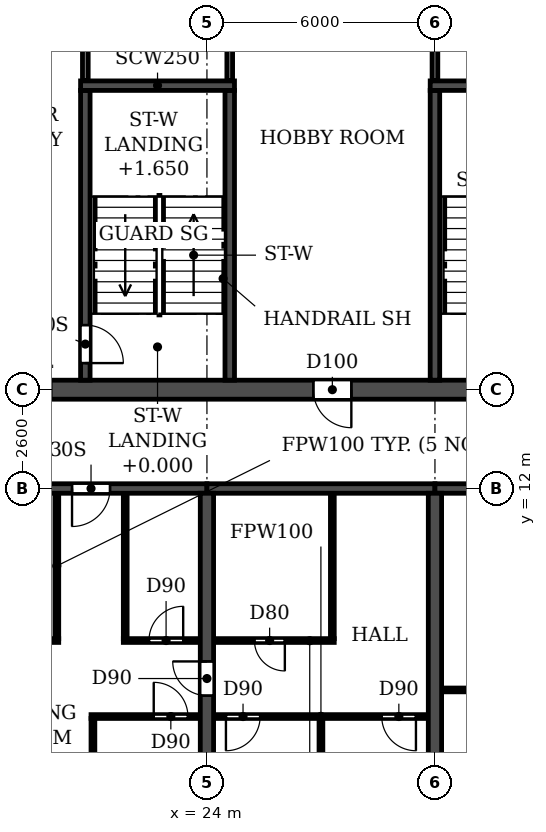
"""IFC4 building model, lengths in metres.
Left out: names, types, materials, properties, quantities, classifications, styles, units other than length and angle.
Written with IfcOpenShell. Run it as: python <this file> out.ifc"""

import sys

from ifc_helpers import new_model, si_unit, direction, frame, frame_2d, origin, place, context, subcontext, project, spatial, rectangle, extrude, element, fill, save


model = new_model("IFC4")
c1 = context("Model", 3, precision=1e-05, world=origin(), true_north=direction((0.0, 1.0)))
c2 = subcontext(c1, "Body", "Model", "MODEL_VIEW")
j1 = project(units=[si_unit("LENGTHUNIT", "METRE"), si_unit("PLANEANGLEUNIT", "RADIAN")], contexts=[c1])
p1 = place(None, origin())
s1 = spatial("IfcSite", under=j1, at=p1, CompositionType="ELEMENT")
p2 = place(p1, origin())
s2 = spatial("IfcBuilding", under=s1, at=p2, CompositionType="ELEMENT")
p3 = place(p2, frame((0.0, 0.0, 102.6)))
s3 = spatial("IfcBuildingStorey", under=s2, at=p3, CompositionType="ELEMENT", Elevation=102.6)
p4 = place(p3, frame((24.0, 0.2, 0.0), z_axis=(0.0, 0.0, 1.0), x_axis=(0.0, 1.0, 0.0)))
e1 = element("IfcWall", 1, at=p4, inside=s3, PredefinedType="SHEAR", context=c2, shape_type="SweptSolid", body=[
    extrude(rectangle(XDim=11.675, YDim=0.35, at=frame_2d((5.837, 0.0))), origin(), (0.0, 0.0, 1.0), 3.0),
])
p5 = place(p4, frame((6.35, 0.0, 0.0)))
e2 = element("IfcOpeningElement", 2, at=p5, cuts=e1, PredefinedType="OPENING", context=c2, shape_type="SweptSolid", body=[
    extrude(rectangle(XDim=0.9, YDim=2.1, at=frame_2d((0.45, 1.05))), frame((0.0, 0.185, 0.0), z_axis=(0.0, -1.0, 0.0), x_axis=(1.0, 0.0, 0.0)), (0.0, 0.0, 1.0), 0.37),
])
p6 = place(p3, frame((30.0, 0.2, 0.0), z_axis=(0.0, 0.0, 1.0), x_axis=(0.0, 1.0, 0.0)))
e3 = element("IfcWall", 3, at=p6, inside=s3, PredefinedType="SHEAR", context=c2, shape_type="SweptSolid", body=[
    extrude(rectangle(XDim=11.675, YDim=0.35, at=frame_2d((5.837, 0.0))), origin(), (0.0, 0.0, 1.0), 3.0),
])
p7 = place(p3, frame((18.0, 12.0, 0.0), z_axis=(0.0, 0.0, 1.0), x_axis=(1.0, 0.0, 0.0)))
e4 = element("IfcWall", 4, at=p7, inside=s3, PredefinedType="SHEAR", context=c2, shape_type="SweptSolid", body=[
    extrude(rectangle(XDim=6.0, YDim=0.25, at=frame_2d((3.0, 0.0))), origin(), (0.0, 0.0, 1.0), 2.4),
])
p8 = place(p7, frame((2.45, 0.0, 0.0)))
e5 = element("IfcOpeningElement", 5, at=p8, cuts=e4, PredefinedType="OPENING", context=c2, shape_type="SweptSolid", body=[
    extrude(rectangle(XDim=1.0, YDim=2.1, at=frame_2d((0.5, 1.05))), frame((0.0, 0.135, 0.0), z_axis=(0.0, -1.0, 0.0), x_axis=(1.0, 0.0, 0.0)), (0.0, 0.0, 1.0), 0.27),
])
p9 = place(p3, frame((24.0, 12.0, 0.0), z_axis=(0.0, 0.0, 1.0), x_axis=(1.0, 0.0, 0.0)))
e6 = element("IfcWall", 6, at=p9, inside=s3, PredefinedType="SHEAR", context=c2, shape_type="SweptSolid", body=[
    extrude(rectangle(XDim=6.0, YDim=0.25, at=frame_2d((3.0, 0.0))), origin(), (0.0, 0.0, 1.0), 2.4),
])
p10 = place(p3, frame((30.0, 12.0, 0.0), z_axis=(0.0, 0.0, 1.0), x_axis=(1.0, 0.0, 0.0)))
e7 = element("IfcWall", 7, at=p10, inside=s3, PredefinedType="SHEAR", context=c2, shape_type="SweptSolid", body=[
    extrude(rectangle(XDim=6.0, YDim=0.25, at=frame_2d((3.0, 0.0))), origin(), (0.0, 0.0, 1.0), 2.4),
])
p11 = place(p10, frame((2.45, 0.0, 0.0)))
e8 = element("IfcOpeningElement", 8, at=p11, cuts=e7, PredefinedType="OPENING", context=c2, shape_type="SweptSolid", body=[
    extrude(rectangle(XDim=1.0, YDim=2.1, at=frame_2d((0.5, 1.05))), frame((0.0, 0.135, 0.0), z_axis=(0.0, -1.0, 0.0), x_axis=(1.0, 0.0, 0.0)), (0.0, 0.0, 1.0), 0.27),
])
p12 = place(p3, frame((8.6, 14.6, 0.0), z_axis=(0.0, 0.0, 1.0), x_axis=(1.0, 0.0, 0.0)))
e9 = element("IfcWall", 9, at=p12, inside=s3, PredefinedType="SOLIDWALL", context=c2, shape_type="SweptSolid", body=[
    extrude(rectangle(XDim=84.8, YDim=0.5, at=frame_2d((42.4, 0.0))), origin(), (0.0, 0.0, 1.0), 3.0),
])
p13 = place(p12, frame((0.9, 0.0, 0.0)))
e10 = element("IfcOpeningElement", 10, at=p13, cuts=e9, PredefinedType="OPENING", context=c2, shape_type="SweptSolid", body=[
    extrude(rectangle(XDim=1.0, YDim=2.1, at=frame_2d((0.5, 1.05))), frame((0.0, 0.26, 0.0), z_axis=(0.0, -1.0, 0.0), x_axis=(1.0, 0.0, 0.0)), (0.0, 0.0, 1.0), 0.52),
])
p14 = place(p12, frame((5.6, 0.0, 0.0)))
e11 = element("IfcOpeningElement", 11, at=p14, cuts=e9, PredefinedType="OPENING", context=c2, shape_type="SweptSolid", body=[
    extrude(rectangle(XDim=1.0, YDim=2.1, at=frame_2d((0.5, 1.05))), frame((0.0, 0.26, 0.0), z_axis=(0.0, -1.0, 0.0), x_axis=(1.0, 0.0, 0.0)), (0.0, 0.0, 1.0), 0.52),
])
p15 = place(p12, frame((10.3, 0.0, 0.0)))
e12 = element("IfcOpeningElement", 12, at=p15, cuts=e9, PredefinedType="OPENING", context=c2, shape_type="SweptSolid", body=[
    extrude(rectangle(XDim=1.0, YDim=2.1, at=frame_2d((0.5, 1.05))), frame((0.0, 0.26, 0.0), z_axis=(0.0, -1.0, 0.0), x_axis=(1.0, 0.0, 0.0)), (0.0, 0.0, 1.0), 0.52),
])
p16 = place(p12, frame((18.2, 0.0, 0.0)))
e13 = element("IfcOpeningElement", 13, at=p16, cuts=e9, PredefinedType="OPENING", context=c2, shape_type="SweptSolid", body=[
    extrude(rectangle(XDim=1.0, YDim=2.1, at=frame_2d((0.5, 1.05))), frame((0.0, 0.26, 0.0), z_axis=(0.0, -1.0, 0.0), x_axis=(1.0, 0.0, 0.0)), (0.0, 0.0, 1.0), 0.52),
])
p17 = place(p12, frame((22.8, 0.0, 0.0)))
e14 = element("IfcOpeningElement", 14, at=p17, cuts=e9, PredefinedType="OPENING", context=c2, shape_type="SweptSolid", body=[
    extrude(rectangle(XDim=1.0, YDim=2.1, at=frame_2d((0.5, 1.05))), frame((0.0, 0.26, 0.0), z_axis=(0.0, -1.0, 0.0), x_axis=(1.0, 0.0, 0.0)), (0.0, 0.0, 1.0), 0.52),
])
p18 = place(p12, frame((36.7, 0.0, 0.0)))
e15 = element("IfcOpeningElement", 15, at=p18, cuts=e9, PredefinedType="OPENING", context=c2, shape_type="SweptSolid", body=[
    extrude(rectangle(XDim=1.0, YDim=2.1, at=frame_2d((0.5, 1.05))), frame((0.0, 0.26, 0.0), z_axis=(0.0, -1.0, 0.0), x_axis=(1.0, 0.0, 0.0)), (0.0, 0.0, 1.0), 0.52),
])
p19 = place(p12, frame((41.9, 0.0, 0.0)))
e16 = element("IfcOpeningElement", 16, at=p19, cuts=e9, PredefinedType="OPENING", context=c2, shape_type="SweptSolid", body=[
    extrude(rectangle(XDim=1.0, YDim=2.1, at=frame_2d((0.5, 1.05))), frame((0.0, 0.26, 0.0), z_axis=(0.0, -1.0, 0.0), x_axis=(1.0, 0.0, 0.0)), (0.0, 0.0, 1.0), 0.52),
])
p20 = place(p12, frame((47.1, 0.0, 0.0)))
e17 = element("IfcOpeningElement", 17, at=p20, cuts=e9, PredefinedType="OPENING", context=c2, shape_type="SweptSolid", body=[
    extrude(rectangle(XDim=1.0, YDim=2.1, at=frame_2d((0.5, 1.05))), frame((0.0, 0.26, 0.0), z_axis=(0.0, -1.0, 0.0), x_axis=(1.0, 0.0, 0.0)), (0.0, 0.0, 1.0), 0.52),
])
p21 = place(p12, frame((61.0, 0.0, 0.0)))
e18 = element("IfcOpeningElement", 18, at=p21, cuts=e9, PredefinedType="OPENING", context=c2, shape_type="SweptSolid", body=[
    extrude(rectangle(XDim=1.0, YDim=2.1, at=frame_2d((0.5, 1.05))), frame((0.0, 0.26, 0.0), z_axis=(0.0, -1.0, 0.0), x_axis=(1.0, 0.0, 0.0)), (0.0, 0.0, 1.0), 0.52),
])
p22 = place(p12, frame((65.6, 0.0, 0.0)))
e19 = element("IfcOpeningElement", 19, at=p22, cuts=e9, PredefinedType="OPENING", context=c2, shape_type="SweptSolid", body=[
    extrude(rectangle(XDim=1.0, YDim=2.1, at=frame_2d((0.5, 1.05))), frame((0.0, 0.26, 0.0), z_axis=(0.0, -1.0, 0.0), x_axis=(1.0, 0.0, 0.0)), (0.0, 0.0, 1.0), 0.52),
])
p23 = place(p12, frame((73.5, 0.0, 0.0)))
e20 = element("IfcOpeningElement", 20, at=p23, cuts=e9, PredefinedType="OPENING", context=c2, shape_type="SweptSolid", body=[
    extrude(rectangle(XDim=1.0, YDim=2.1, at=frame_2d((0.5, 1.05))), frame((0.0, 0.26, 0.0), z_axis=(0.0, -1.0, 0.0), x_axis=(1.0, 0.0, 0.0)), (0.0, 0.0, 1.0), 0.52),
])
p24 = place(p12, frame((79.6, 0.0, 0.0)))
e21 = element("IfcOpeningElement", 21, at=p24, cuts=e9, PredefinedType="OPENING", context=c2, shape_type="SweptSolid", body=[
    extrude(rectangle(XDim=1.0, YDim=2.1, at=frame_2d((0.5, 1.05))), frame((0.0, 0.26, 0.0), z_axis=(0.0, -1.0, 0.0), x_axis=(1.0, 0.0, 0.0)), (0.0, 0.0, 1.0), 0.52),
])
p25 = place(p3, frame((30.0, 14.85, 0.0), z_axis=(0.0, 0.0, 1.0), x_axis=(0.0, 1.0, 0.0)))
e22 = element("IfcWall", 22, at=p25, inside=s3, PredefinedType="SOLIDWALL", context=c2, shape_type="SweptSolid", body=[
    extrude(rectangle(XDim=7.625, YDim=0.25, at=frame_2d((3.812, 0.0))), origin(), (0.0, 0.0, 1.0), 3.0),
])
p26 = place(p3, frame((29.875, 22.6, 0.0), z_axis=(0.0, 0.0, 1.0), x_axis=(1.0, 0.0, 0.0)))
e23 = element("IfcWall", 23, at=p26, inside=s3, PredefinedType="SOLIDWALL", context=c2, shape_type="SweptSolid", body=[
    extrude(rectangle(XDim=4.05, YDim=0.25, at=frame_2d((2.025, 0.0))), origin(), (0.0, 0.0, 1.0), 3.0),
])
p27 = place(p3, frame((20.8, 14.85, 0.0), z_axis=(0.0, 0.0, 1.0), x_axis=(0.0, 1.0, 0.0)))
e24 = element("IfcWall", 24, at=p27, inside=s3, PredefinedType="SOLIDWALL", context=c2, shape_type="SweptSolid", body=[
    extrude(rectangle(XDim=7.625, YDim=0.25, at=frame_2d((3.812, 0.0))), origin(), (0.0, 0.0, 1.0), 3.0),
])
p28 = place(p27, frame((0.45, 0.0, 0.0)))
e25 = element("IfcOpeningElement", 25, at=p28, cuts=e24, PredefinedType="OPENING", context=c2, shape_type="SweptSolid", body=[
    extrude(rectangle(XDim=1.0, YDim=2.1, at=frame_2d((0.5, 1.05))), frame((0.0, 0.135, 0.0), z_axis=(0.0, -1.0, 0.0), x_axis=(1.0, 0.0, 0.0)), (0.0, 0.0, 1.0), 0.27),
])
p29 = place(p3, frame((24.6, 14.85, 0.0), z_axis=(0.0, 0.0, 1.0), x_axis=(0.0, 1.0, 0.0)))
e26 = element("IfcWall", 26, at=p29, inside=s3, PredefinedType="SOLIDWALL", context=c2, shape_type="SweptSolid", body=[
    extrude(rectangle(XDim=7.625, YDim=0.25, at=frame_2d((3.812, 0.0))), origin(), (0.0, 0.0, 1.0), 3.0),
])
p30 = place(p3, frame((20.675, 22.6, 0.0), z_axis=(0.0, 0.0, 1.0), x_axis=(1.0, 0.0, 0.0)))
e27 = element("IfcWall", 27, at=p30, inside=s3, PredefinedType="SOLIDWALL", context=c2, shape_type="SweptSolid", body=[
    extrude(rectangle(XDim=4.05, YDim=0.25, at=frame_2d((2.025, 0.0))), origin(), (0.0, 0.0, 1.0), 3.0),
])
p31 = place(p3, frame((20.95, 6.0, 0.0), z_axis=(0.0, 0.0, 1.0), x_axis=(1.0, 0.0, 0.0)))
e28 = element("IfcWall", 28, at=p31, inside=s3, PredefinedType="PARTITIONING", context=c2, shape_type="SweptSolid", body=[
    extrude(rectangle(XDim=2.865, YDim=0.1, at=frame_2d((1.433, 0.0))), origin(), (0.0, 0.0, 1.0), 3.0),
])
p32 = place(p31, frame((1.65, 0.0, 0.0)))
e29 = element("IfcOpeningElement", 29, at=p32, cuts=e28, PredefinedType="OPENING", context=c2, shape_type="SweptSolid", body=[
    extrude(rectangle(XDim=0.9, YDim=2.1, at=frame_2d((0.45, 1.05))), frame((0.0, 0.06, 0.0), z_axis=(0.0, -1.0, 0.0), x_axis=(1.0, 0.0, 0.0)), (0.0, 0.0, 1.0), 0.12),
])
p33 = place(p3, frame((24.185, 6.0, 0.0), z_axis=(0.0, 0.0, 1.0), x_axis=(1.0, 0.0, 0.0)))
e30 = element("IfcWall", 30, at=p33, inside=s3, PredefinedType="PARTITIONING", context=c2, shape_type="SweptSolid", body=[
    extrude(rectangle(XDim=5.63, YDim=0.1, at=frame_2d((2.815, 0.0))), origin(), (0.0, 0.0, 1.0), 3.0),
])
p34 = place(p33, frame((0.315, 0.0, 0.0)))
e31 = element("IfcOpeningElement", 31, at=p34, cuts=e30, PredefinedType="OPENING", context=c2, shape_type="SweptSolid", body=[
    extrude(rectangle(XDim=0.9, YDim=2.1, at=frame_2d((0.45, 1.05))), frame((0.0, 0.06, 0.0), z_axis=(0.0, -1.0, 0.0), x_axis=(1.0, 0.0, 0.0)), (0.0, 0.0, 1.0), 0.12),
])
p35 = place(p33, frame((4.415, 0.0, 0.0)))
e32 = element("IfcOpeningElement", 32, at=p35, cuts=e30, PredefinedType="OPENING", context=c2, shape_type="SweptSolid", body=[
    extrude(rectangle(XDim=0.9, YDim=2.1, at=frame_2d((0.45, 1.05))), frame((0.0, 0.06, 0.0), z_axis=(0.0, -1.0, 0.0), x_axis=(1.0, 0.0, 0.0)), (0.0, 0.0, 1.0), 0.12),
])
p36 = place(p3, frame((30.185, 6.7, 0.0), z_axis=(0.0, 0.0, 1.0), x_axis=(1.0, 0.0, 0.0)))
e33 = element("IfcWall", 33, at=p36, inside=s3, PredefinedType="PARTITIONING", context=c2, shape_type="SweptSolid", body=[
    extrude(rectangle(XDim=1.915, YDim=0.1, at=frame_2d((0.958, 0.0))), origin(), (0.0, 0.0, 1.0), 3.0),
])
p37 = place(p3, frame((18.185, 8.0, 0.0), z_axis=(0.0, 0.0, 1.0), x_axis=(1.0, 0.0, 0.0)))
e34 = element("IfcWall", 34, at=p37, inside=s3, PredefinedType="PARTITIONING", context=c2, shape_type="SweptSolid", body=[
    extrude(rectangle(XDim=1.915, YDim=0.1, at=frame_2d((0.958, 0.0))), origin(), (0.0, 0.0, 1.0), 3.0),
])
p38 = place(p37, frame((0.44, 0.0, 0.0)))
e35 = element("IfcOpeningElement", 35, at=p38, cuts=e34, PredefinedType="OPENING", context=c2, shape_type="SweptSolid", body=[
    extrude(rectangle(XDim=0.8, YDim=2.1, at=frame_2d((0.4, 1.05))), frame((0.0, 0.06, 0.0), z_axis=(0.0, -1.0, 0.0), x_axis=(1.0, 0.0, 0.0)), (0.0, 0.0, 1.0), 0.12),
])
p39 = place(p3, frame((21.8, 8.0, 0.0), z_axis=(0.0, 0.0, 1.0), x_axis=(1.0, 0.0, 0.0)))
e36 = element("IfcWall", 36, at=p39, inside=s3, PredefinedType="PARTITIONING", context=c2, shape_type="SweptSolid", body=[
    extrude(rectangle(XDim=2.015, YDim=0.1, at=frame_2d((1.007, 0.0))), origin(), (0.0, 0.0, 1.0), 3.0),
])
p40 = place(p39, frame((0.675, 0.0, 0.0)))
e37 = element("IfcOpeningElement", 37, at=p40, cuts=e36, PredefinedType="OPENING", context=c2, shape_type="SweptSolid", body=[
    extrude(rectangle(XDim=0.9, YDim=2.1, at=frame_2d((0.45, 1.05))), frame((0.0, 0.06, 0.0), z_axis=(0.0, -1.0, 0.0), x_axis=(1.0, 0.0, 0.0)), (0.0, 0.0, 1.0), 0.12),
])
p41 = place(p3, frame((24.185, 8.0, 0.0), z_axis=(0.0, 0.0, 1.0), x_axis=(1.0, 0.0, 0.0)))
e38 = element("IfcWall", 38, at=p41, inside=s3, PredefinedType="PARTITIONING", context=c2, shape_type="SweptSolid", body=[
    extrude(rectangle(XDim=3.165, YDim=0.1, at=frame_2d((1.583, 0.0))), origin(), (0.0, 0.0, 1.0), 3.0),
])
p42 = place(p41, frame((1.065, 0.0, 0.0)))
e39 = element("IfcOpeningElement", 39, at=p42, cuts=e38, PredefinedType="OPENING", context=c2, shape_type="SweptSolid", body=[
    extrude(rectangle(XDim=0.8, YDim=2.1, at=frame_2d((0.4, 1.05))), frame((0.0, 0.06, 0.0), z_axis=(0.0, -1.0, 0.0), x_axis=(1.0, 0.0, 0.0)), (0.0, 0.0, 1.0), 0.12),
])
p43 = place(p3, frame((20.05, 8.05, 0.0), z_axis=(0.0, 0.0, 1.0), x_axis=(0.0, 1.0, 0.0)))
e40 = element("IfcWall", 40, at=p43, inside=s3, PredefinedType="PARTITIONING", context=c2, shape_type="SweptSolid", body=[
    extrude(rectangle(XDim=3.815, YDim=0.1, at=frame_2d((1.907, 0.0))), origin(), (0.0, 0.0, 1.0), 3.0),
])
p44 = place(p3, frame((21.0, 0.06, 0.0), z_axis=(0.0, 0.0, 1.0), x_axis=(0.0, 1.0, 0.0)))
e41 = element("IfcWall", 41, at=p44, inside=s3, PredefinedType="PARTITIONING", context=c2, shape_type="SweptSolid", body=[
    extrude(rectangle(XDim=5.89, YDim=0.1, at=frame_2d((2.945, 0.0))), origin(), (0.0, 0.0, 1.0), 3.0),
])
p45 = place(p3, frame((21.85, 8.05, 0.0), z_axis=(0.0, 0.0, 1.0), x_axis=(0.0, 1.0, 0.0)))
e42 = element("IfcWall", 42, at=p45, inside=s3, PredefinedType="PARTITIONING", context=c2, shape_type="SweptSolid", body=[
    extrude(rectangle(XDim=3.815, YDim=0.1, at=frame_2d((1.907, 0.0))), origin(), (0.0, 0.0, 1.0), 3.0),
])
p46 = place(p3, frame((27.0, 0.06, 0.0), z_axis=(0.0, 0.0, 1.0), x_axis=(0.0, 1.0, 0.0)))
e43 = element("IfcWall", 43, at=p46, inside=s3, PredefinedType="PARTITIONING", context=c2, shape_type="SweptSolid", body=[
    extrude(rectangle(XDim=5.89, YDim=0.1, at=frame_2d((2.945, 0.0))), origin(), (0.0, 0.0, 1.0), 3.0),
])
p47 = place(p3, frame((27.3, 8.05, 0.0), z_axis=(0.0, 0.0, 1.0), x_axis=(0.0, 1.0, 0.0)))
e44 = element("IfcWall", 44, at=p47, inside=s3, PredefinedType="PARTITIONING", context=c2, shape_type="SweptSolid", body=[
    extrude(rectangle(XDim=3.815, YDim=0.1, at=frame_2d((1.907, 0.0))), origin(), (0.0, 0.0, 1.0), 3.0),
])
for number, where, z_axis, x_axis in (
    (45, (20.8, 22.735, 0.0), (0.0, 0.0, 1.0), (0.0, 1.0, 0.0)),
    (46, (24.6, 22.735, 0.0), (0.0, 0.0, 1.0), (0.0, 1.0, 0.0)),
    (47, (30.0, 22.735, 0.0), (0.0, 0.0, 1.0), (0.0, 1.0, 0.0)),
):
    element("IfcWall", number, at=place(p3, frame(where, z_axis=z_axis, x_axis=x_axis)), inside=s3, PredefinedType="PARTITIONING", context=c2, shape_type="SweptSolid", body=[
        extrude(rectangle(XDim=4.805, YDim=0.15, at=frame_2d((2.402, 0.0))), origin(), (0.0, 0.0, 1.0), 3.0),
    ])
p48 = place(p16, frame((1.0, 0.0, 0.0), z_axis=(0.0, 0.0, 1.0), x_axis=(-1.0, 0.0, 0.0)))
e48 = element("IfcDoor", 48, at=p48, inside=s3, OperationType="SINGLE_SWING_LEFT", PredefinedType="DOOR", context=c2, shape_type="SweptSolid", body=[
    extrude(rectangle(XDim=1.0, YDim=2.1, at=frame_2d((0.5, 1.05))), frame((0.0, 0.025, 0.0), z_axis=(0.0, -1.0, 0.0), x_axis=(1.0, 0.0, 0.0)), (0.0, 0.0, 1.0), 0.05),
])
fill(e13, e48)
p49 = place(p34, frame((0.9, 0.0, 0.0), z_axis=(0.0, 0.0, 1.0), x_axis=(-1.0, 0.0, 0.0)))
e49 = element("IfcDoor", 49, at=p49, inside=s3, OperationType="SINGLE_SWING_RIGHT", PredefinedType="DOOR", context=c2, shape_type="SweptSolid", body=[
    extrude(rectangle(XDim=0.9, YDim=2.1, at=frame_2d((0.45, 1.05))), frame((0.0, 0.025, 0.0), z_axis=(0.0, -1.0, 0.0), x_axis=(1.0, 0.0, 0.0)), (0.0, 0.0, 1.0), 0.05),
])
fill(e31, e49)
p50 = place(p42, frame((0.8, 0.0, 0.0), z_axis=(0.0, 0.0, 1.0), x_axis=(-1.0, 0.0, 0.0)))
e50 = element("IfcDoor", 50, at=p50, inside=s3, OperationType="SINGLE_SWING_LEFT", PredefinedType="DOOR", context=c2, shape_type="SweptSolid", body=[
    extrude(rectangle(XDim=0.8, YDim=2.1, at=frame_2d((0.4, 1.05))), frame((0.0, 0.025, 0.0), z_axis=(0.0, -1.0, 0.0), x_axis=(1.0, 0.0, 0.0)), (0.0, 0.0, 1.0), 0.05),
])
fill(e39, e50)
p51 = place(p35, frame((0.9, 0.0, 0.0), z_axis=(0.0, 0.0, 1.0), x_axis=(-1.0, 0.0, 0.0)))
e51 = element("IfcDoor", 51, at=p51, inside=s3, OperationType="SINGLE_SWING_LEFT", PredefinedType="DOOR", context=c2, shape_type="SweptSolid", body=[
    extrude(rectangle(XDim=0.9, YDim=2.1, at=frame_2d((0.45, 1.05))), frame((0.0, 0.025, 0.0), z_axis=(0.0, -1.0, 0.0), x_axis=(1.0, 0.0, 0.0)), (0.0, 0.0, 1.0), 0.05),
])
fill(e32, e51)
p52 = place(p8, frame((1.0, 0.0, 0.0), z_axis=(0.0, 0.0, 1.0), x_axis=(-1.0, 0.0, 0.0)))
e52 = element("IfcDoor", 52, at=p52, inside=s3, OperationType="SINGLE_SWING_RIGHT", PredefinedType="DOOR", context=c2, shape_type="SweptSolid", body=[
    extrude(rectangle(XDim=1.0, YDim=2.1, at=frame_2d((0.5, 1.05))), frame((0.0, 0.025, 0.0), z_axis=(0.0, -1.0, 0.0), x_axis=(1.0, 0.0, 0.0)), (0.0, 0.0, 1.0), 0.05),
])
fill(e5, e52)
p53 = place(p40, origin())
e53 = element("IfcDoor", 53, at=p53, inside=s3, OperationType="SINGLE_SWING_RIGHT", PredefinedType="DOOR", context=c2, shape_type="SweptSolid", body=[
    extrude(rectangle(XDim=0.9, YDim=2.1, at=frame_2d((0.45, 1.05))), frame((0.0, 0.025, 0.0), z_axis=(0.0, -1.0, 0.0), x_axis=(1.0, 0.0, 0.0)), (0.0, 0.0, 1.0), 0.05),
])
fill(e37, e53)
p54 = place(p32, origin())
e54 = element("IfcDoor", 54, at=p54, inside=s3, OperationType="SINGLE_SWING_LEFT", PredefinedType="DOOR", context=c2, shape_type="SweptSolid", body=[
    extrude(rectangle(XDim=0.9, YDim=2.1, at=frame_2d((0.45, 1.05))), frame((0.0, 0.025, 0.0), z_axis=(0.0, -1.0, 0.0), x_axis=(1.0, 0.0, 0.0)), (0.0, 0.0, 1.0), 0.05),
])
fill(e29, e54)
p55 = place(p5, origin())
e55 = element("IfcDoor", 55, at=p55, inside=s3, OperationType="SINGLE_SWING_RIGHT", PredefinedType="DOOR", context=c2, shape_type="SweptSolid", body=[
    extrude(rectangle(XDim=0.9, YDim=2.1, at=frame_2d((0.45, 1.05))), frame((0.0, 0.025, 0.0), z_axis=(0.0, -1.0, 0.0), x_axis=(1.0, 0.0, 0.0)), (0.0, 0.0, 1.0), 0.05),
])
fill(e2, e55)
p56 = place(p28, frame((1.0, 0.0, 0.0), z_axis=(0.0, 0.0, 1.0), x_axis=(-1.0, 0.0, 0.0)))
e56 = element("IfcDoor", 56, at=p56, inside=s3, OperationType="SINGLE_SWING_RIGHT", PredefinedType="DOOR", context=c2, shape_type="SweptSolid", body=[
    extrude(rectangle(XDim=1.0, YDim=2.1, at=frame_2d((0.5, 1.05))), frame((0.0, 0.025, 0.0), z_axis=(0.0, -1.0, 0.0), x_axis=(1.0, 0.0, 0.0)), (0.0, 0.0, 1.0), 0.05),
])
fill(e25, e56)
save(model, sys.argv[1])
